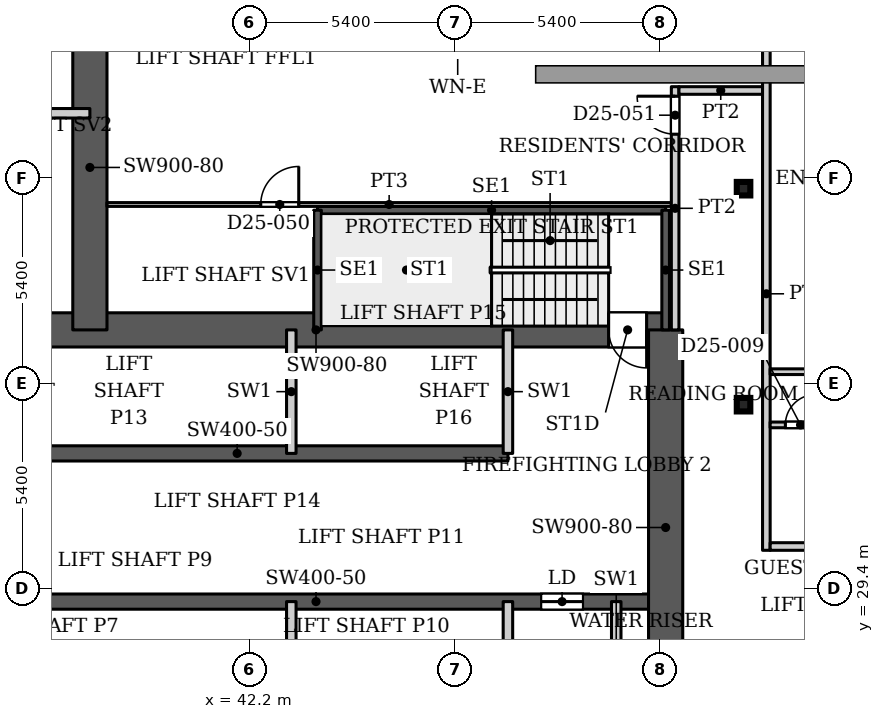
"""IFC4 building model, lengths in metres.
Left out: names, types, materials, properties, quantities, classifications, styles, units other than length and angle.
Written with IfcOpenShell. Run it as: python <this file> out.ifc"""

import sys

from ifc_helpers import new_model, si_unit, direction, frame, frame_2d, origin, origin_2d, place, context, subcontext, project, spatial, rectangle, hollow_rectangle, extrude, source, transform, mapped, element, fill, save


model = new_model("IFC4")
c1 = context("Model", 3, precision=1e-05, world=origin(), true_north=direction((0.0, 1.0)))
c2 = subcontext(c1, "Body", "Model", "MODEL_VIEW")
j1 = project(units=[si_unit("LENGTHUNIT", "METRE"), si_unit("PLANEANGLEUNIT", "RADIAN")], contexts=[c1])
p1 = place(None, origin())
s1 = spatial("IfcSite", under=j1, at=p1, CompositionType="ELEMENT")
p2 = place(p1, origin())
s2 = spatial("IfcBuilding", under=s1, at=p2, CompositionType="ELEMENT")
p3 = place(p2, frame((0.0, 0.0, 109.7)))
s3 = spatial("IfcBuildingStorey", under=s2, at=p3, CompositionType="ELEMENT", Elevation=109.7)
for number, where, z_axis, x_axis in (
    (1, (55.2, 34.232, 0.0), (0.0, 0.0, 1.0), (1.0, 0.0, 0.0)),
    (2, (55.2, 39.916, 0.0), (0.0, 0.0, 1.0), (1.0, 0.0, 0.0)),
):
    element("IfcColumn", number, at=place(p3, frame(where, z_axis=z_axis, x_axis=x_axis)), inside=s3, PredefinedType="COLUMN", context=c2, shape_type="SweptSolid", body=[
        extrude(hollow_rectangle(XDim=0.356, YDim=0.356, WallThickness=0.016, InnerFilletRadius=0.016, OuterFilletRadius=0.032, at=origin_2d()), origin(), (0.0, 0.0, 1.0), 3.9),
    ])
p4 = place(p3, frame((34.75, 29.05, 0.0), z_axis=(0.0, 0.0, 1.0), x_axis=(1.0, 0.0, 0.0)))
e3 = element("IfcWall", 3, at=p4, inside=s3, PredefinedType="SHEAR", context=c2, shape_type="SweptSolid", body=[
    extrude(rectangle(XDim=18.4, YDim=0.4, at=frame_2d((9.2, 0.0))), origin(), (0.0, 0.0, 1.0), 3.9),
])
p5 = place(p4, frame((15.125, 0.0, 0.0)))
e4 = element("IfcOpeningElement", 4, at=p5, cuts=e3, PredefinedType="OPENING", context=c2, shape_type="SweptSolid", body=[
    extrude(rectangle(XDim=1.1, YDim=2.2, at=frame_2d((0.55, 1.1))), frame((0.0, 0.21, 0.0), z_axis=(0.0, -1.0, 0.0), x_axis=(1.0, 0.0, 0.0)), (0.0, 0.0, 1.0), 0.42),
])
p6 = place(p3, frame((34.75, 32.95, 0.0), z_axis=(0.0, 0.0, 1.0), x_axis=(1.0, 0.0, 0.0)))
e5 = element("IfcWall", 5, at=p6, inside=s3, PredefinedType="SHEAR", context=c2, shape_type="SweptSolid", body=[
    extrude(rectangle(XDim=14.25, YDim=0.4, at=frame_2d((7.125, 0.0))), origin(), (0.0, 0.0, 1.0), 3.9),
])
p7 = place(p3, frame((34.75, 36.2, 0.0), z_axis=(0.0, 0.0, 1.0), x_axis=(1.0, 0.0, 0.0)))
e6 = element("IfcWall", 6, at=p7, inside=s3, PredefinedType="SHEAR", context=c2, shape_type="SweptSolid", body=[
    extrude(rectangle(XDim=18.4, YDim=0.9, at=frame_2d((9.2, 0.0))), origin(), (0.0, 0.0, 1.0), 3.9),
])
p8 = place(p7, frame((16.9, 0.0, 0.0)))
e7 = element("IfcOpeningElement", 7, at=p8, cuts=e6, PredefinedType="OPENING", context=c2, shape_type="SweptSolid", body=[
    extrude(rectangle(XDim=1.0, YDim=2.2, at=frame_2d((0.5, 1.1))), frame((0.0, 0.46, 0.0), z_axis=(0.0, -1.0, 0.0), x_axis=(1.0, 0.0, 0.0)), (0.0, 0.0, 1.0), 0.92),
])
p9 = place(p3, frame((38.0, 36.2, 0.0), z_axis=(0.0, 0.0, 1.0), x_axis=(0.0, 1.0, 0.0)))
e8 = element("IfcWall", 8, at=p9, inside=s3, PredefinedType="SHEAR", context=c2, shape_type="SweptSolid", body=[
    extrude(rectangle(XDim=8.55, YDim=0.9, at=frame_2d((4.275, 0.0))), origin(), (0.0, 0.0, 1.0), 3.9),
])
p10 = place(p3, frame((53.15, 25.8, 0.0), z_axis=(0.0, 0.0, 1.0), x_axis=(0.0, 1.0, 0.0)))
e9 = element("IfcWall", 9, at=p10, inside=s3, PredefinedType="SHEAR", context=c2, shape_type="SweptSolid", body=[
    extrude(rectangle(XDim=10.4, YDim=0.9, at=frame_2d((5.2, 0.0))), origin(), (0.0, 0.0, 1.0), 3.9),
])
p11 = place(p10, frame((1.175, 0.0, 0.0)))
e10 = element("IfcOpeningElement", 10, at=p11, cuts=e9, PredefinedType="OPENING", context=c2, shape_type="SweptSolid", body=[
    extrude(rectangle(XDim=0.9, YDim=2.2, at=frame_2d((0.45, 1.1))), frame((0.0, 0.46, 0.0), z_axis=(0.0, -1.0, 0.0), x_axis=(1.0, 0.0, 0.0)), (0.0, 0.0, 1.0), 0.92),
])
p12 = place(p3, frame((43.99, 39.35, 0.0), z_axis=(0.0, 0.0, 1.0), x_axis=(1.0, 0.0, 0.0)))
e11 = element("IfcWall", 11, at=p12, inside=s3, PredefinedType="SHEAR", context=c2, shape_type="SweptSolid", body=[
    extrude(rectangle(XDim=9.16, YDim=0.2, at=frame_2d((4.58, 0.0))), origin(), (0.0, 0.0, 1.0), 3.9),
])
for number, where, z_axis, x_axis in (
    (12, (43.99, 36.2, 0.0), (0.0, 0.0, 1.0), (0.0, 1.0, 0.0)),
    (13, (53.15, 36.2, 0.0), (0.0, 0.0, 1.0), (0.0, 1.0, 0.0)),
):
    element("IfcWall", number, at=place(p3, frame(where, z_axis=z_axis, x_axis=x_axis)), inside=s3, PredefinedType="SHEAR", context=c2, shape_type="SweptSolid", body=[
        extrude(rectangle(XDim=3.15, YDim=0.2, at=frame_2d((1.575, 0.0))), origin(), (0.0, 0.0, 1.0), 3.9),
    ])
for number, where, z_axis, x_axis in (
    (14, (43.3, 25.8, 0.0), (0.0, 0.0, 1.0), (0.0, 1.0, 0.0)),
    (15, (43.3, 32.95, 0.0), (0.0, 0.0, 1.0), (0.0, 1.0, 0.0)),
    (16, (49.0, 25.8, 0.0), (0.0, 0.0, 1.0), (0.0, 1.0, 0.0)),
    (17, (49.0, 32.95, 0.0), (0.0, 0.0, 1.0), (0.0, 1.0, 0.0)),
    (18, (51.85, 25.8, 0.0), (0.0, 0.0, 1.0), (0.0, 1.0, 0.0)),
    (19, (34.75, 41.9, 0.0), (0.0, 0.0, 1.0), (1.0, 0.0, 0.0)),
):
    element("IfcWall", number, at=place(p3, frame(where, z_axis=z_axis, x_axis=x_axis)), inside=s3, PredefinedType="PARTITIONING", context=c2, shape_type="SweptSolid", body=[
        extrude(rectangle(XDim=3.25, YDim=0.25, at=frame_2d((1.625, 0.0))), origin(), (0.0, 0.0, 1.0), 3.9),
    ])
p13 = place(p3, frame((38.449, 39.5, 0.0), z_axis=(0.0, 0.0, 1.0), x_axis=(1.0, 0.0, 0.0)))
e20 = element("IfcWall", 20, at=p13, inside=s3, PredefinedType="PARTITIONING", context=c2, shape_type="SweptSolid", body=[
    extrude(rectangle(XDim=14.851, YDim=0.1, at=frame_2d((7.426, 0.0))), origin(), (0.0, 0.0, 1.0), 3.6),
])
p14 = place(p13, frame((4.047, 0.0, 0.0)))
e21 = element("IfcOpeningElement", 21, at=p14, cuts=e20, PredefinedType="OPENING", context=c2, shape_type="SweptSolid", body=[
    extrude(rectangle(XDim=1.0, YDim=2.1, at=frame_2d((0.5, 1.05))), frame((0.0, 0.06, 0.0), z_axis=(0.0, -1.0, 0.0), x_axis=(1.0, 0.0, 0.0)), (0.0, 0.0, 1.0), 0.12),
])
p15 = place(p3, frame((53.4, 36.199, 0.0), z_axis=(0.0, 0.0, 1.0), x_axis=(0.0, 1.0, 0.0)))
e22 = element("IfcWall", 22, at=p15, inside=s3, PredefinedType="PARTITIONING", context=c2, shape_type="SweptSolid", body=[
    extrude(rectangle(XDim=6.401, YDim=0.2, at=frame_2d((3.201, 0.0))), origin(), (0.0, 0.0, 1.0), 3.6),
])
p16 = place(p15, frame((5.151, 0.0, 0.0)))
e23 = element("IfcOpeningElement", 23, at=p16, cuts=e22, PredefinedType="OPENING", context=c2, shape_type="SweptSolid", body=[
    extrude(rectangle(XDim=1.0, YDim=2.1, at=frame_2d((0.5, 1.05))), frame((0.0, 0.11, 0.0), z_axis=(0.0, -1.0, 0.0), x_axis=(1.0, 0.0, 0.0)), (0.0, 0.0, 1.0), 0.22),
])
p17 = place(p3, frame((53.5, 42.5, 0.0), z_axis=(0.0, 0.0, 1.0), x_axis=(1.0, 0.0, 0.0)))
e24 = element("IfcWall", 24, at=p17, inside=s3, PredefinedType="PARTITIONING", context=c2, shape_type="SweptSolid", body=[
    extrude(rectangle(XDim=2.2, YDim=0.2, at=frame_2d((1.1, 0.0))), origin(), (0.0, 0.0, 1.0), 3.6),
])
p18 = place(p3, frame((55.8, 30.4, 0.0), z_axis=(0.0, 0.0, 1.0), x_axis=(0.0, 1.0, 0.0)))
e25 = element("IfcWall", 25, at=p18, inside=s3, PredefinedType="PARTITIONING", context=c2, shape_type="SweptSolid", body=[
    extrude(rectangle(XDim=13.5, YDim=0.2, at=frame_2d((6.75, 0.0))), origin(), (0.0, 0.0, 1.0), 3.6),
])
p19 = place(p3, frame((55.9, 30.5, 0.0), z_axis=(0.0, 0.0, 1.0), x_axis=(1.0, 0.0, 0.0)))
e26 = element("IfcWall", 26, at=p19, inside=s3, PredefinedType="PARTITIONING", context=c2, shape_type="SweptSolid", body=[
    extrude(rectangle(XDim=42.2, YDim=0.2, at=frame_2d((21.1, 0.0))), origin(), (0.0, 0.0, 1.0), 3.6),
])
p20 = place(p19, frame((9.75, 0.0, 0.0)))
e27 = element("IfcOpeningElement", 27, at=p20, cuts=e26, PredefinedType="OPENING", context=c2, shape_type="SweptSolid", body=[
    extrude(rectangle(XDim=1.0, YDim=2.1, at=frame_2d((0.5, 1.05))), frame((0.0, 0.11, 0.0), z_axis=(0.0, -1.0, 0.0), x_axis=(1.0, 0.0, 0.0)), (0.0, 0.0, 1.0), 0.22),
])
p21 = place(p19, frame((18.6, 0.0, 0.0)))
e28 = element("IfcOpeningElement", 28, at=p21, cuts=e26, PredefinedType="OPENING", context=c2, shape_type="SweptSolid", body=[
    extrude(rectangle(XDim=1.0, YDim=2.1, at=frame_2d((0.5, 1.05))), frame((0.0, 0.11, 0.0), z_axis=(0.0, -1.0, 0.0), x_axis=(1.0, 0.0, 0.0)), (0.0, 0.0, 1.0), 0.22),
])
p22 = place(p19, frame((23.4, 0.0, 0.0)))
e29 = element("IfcOpeningElement", 29, at=p22, cuts=e26, PredefinedType="OPENING", context=c2, shape_type="SweptSolid", body=[
    extrude(rectangle(XDim=1.0, YDim=2.1, at=frame_2d((0.5, 1.05))), frame((0.0, 0.11, 0.0), z_axis=(0.0, -1.0, 0.0), x_axis=(1.0, 0.0, 0.0)), (0.0, 0.0, 1.0), 0.22),
])
p23 = place(p19, frame((40.2, 0.0, 0.0)))
e30 = element("IfcOpeningElement", 30, at=p23, cuts=e26, PredefinedType="OPENING", context=c2, shape_type="SweptSolid", body=[
    extrude(rectangle(XDim=1.0, YDim=2.1, at=frame_2d((0.5, 1.05))), frame((0.0, 0.11, 0.0), z_axis=(0.0, -1.0, 0.0), x_axis=(1.0, 0.0, 0.0)), (0.0, 0.0, 1.0), 0.22),
])
p24 = place(p3, frame((55.9, 33.7, 0.0), z_axis=(0.0, 0.0, 1.0), x_axis=(1.0, 0.0, 0.0)))
e31 = element("IfcWall", 31, at=p24, inside=s3, PredefinedType="PARTITIONING", context=c2, shape_type="SweptSolid", body=[
    extrude(rectangle(XDim=9.275, YDim=0.15, at=frame_2d((4.638, 0.0))), origin(), (0.0, 0.0, 1.0), 3.6),
])
p25 = place(p24, frame((7.6, 0.0, 0.0)))
e32 = element("IfcOpeningElement", 32, at=p25, cuts=e31, PredefinedType="OPENING", context=c2, shape_type="SweptSolid", body=[
    extrude(rectangle(XDim=0.8, YDim=2.1, at=frame_2d((0.4, 1.05))), frame((0.0, 0.085, 0.0), z_axis=(0.0, -1.0, 0.0), x_axis=(1.0, 0.0, 0.0)), (0.0, 0.0, 1.0), 0.17),
])
p26 = place(p24, frame((2.9, 0.0, 0.0)))
e33 = element("IfcOpeningElement", 33, at=p26, cuts=e31, PredefinedType="OPENING", context=c2, shape_type="SweptSolid", body=[
    extrude(rectangle(XDim=0.9, YDim=2.1, at=frame_2d((0.45, 1.05))), frame((0.0, 0.085, 0.0), z_axis=(0.0, -1.0, 0.0), x_axis=(1.0, 0.0, 0.0)), (0.0, 0.0, 1.0), 0.17),
])
p27 = place(p24, frame((5.5, 0.0, 0.0)))
e34 = element("IfcOpeningElement", 34, at=p27, cuts=e31, PredefinedType="OPENING", context=c2, shape_type="SweptSolid", body=[
    extrude(rectangle(XDim=0.8, YDim=2.1, at=frame_2d((0.4, 1.05))), frame((0.0, 0.085, 0.0), z_axis=(0.0, -1.0, 0.0), x_axis=(1.0, 0.0, 0.0)), (0.0, 0.0, 1.0), 0.17),
])
p28 = place(p24, frame((0.4, 0.0, 0.0)))
e35 = element("IfcOpeningElement", 35, at=p28, cuts=e31, PredefinedType="OPENING", context=c2, shape_type="SweptSolid", body=[
    extrude(rectangle(XDim=0.8, YDim=2.1, at=frame_2d((0.4, 1.05))), frame((0.0, 0.085, 0.0), z_axis=(0.0, -1.0, 0.0), x_axis=(1.0, 0.0, 0.0)), (0.0, 0.0, 1.0), 0.17),
])
p29 = place(p3, frame((55.9, 35.1, 0.0), z_axis=(0.0, 0.0, 1.0), x_axis=(1.0, 0.0, 0.0)))
e36 = element("IfcWall", 36, at=p29, inside=s3, PredefinedType="PARTITIONING", context=c2, shape_type="SweptSolid", body=[
    extrude(rectangle(XDim=11.2, YDim=0.15, at=frame_2d((5.6, 0.0))), origin(), (0.0, 0.0, 1.0), 3.6),
])
p30 = place(p29, frame((9.05, 0.0, 0.0)))
e37 = element("IfcOpeningElement", 37, at=p30, cuts=e36, PredefinedType="OPENING", context=c2, shape_type="SweptSolid", body=[
    extrude(rectangle(XDim=0.9, YDim=2.1, at=frame_2d((0.45, 1.05))), frame((0.0, 0.085, 0.0), z_axis=(0.0, -1.0, 0.0), x_axis=(1.0, 0.0, 0.0)), (0.0, 0.0, 1.0), 0.17),
])
p31 = place(p29, frame((1.5, 0.0, 0.0)))
e38 = element("IfcOpeningElement", 38, at=p31, cuts=e36, PredefinedType="OPENING", context=c2, shape_type="SweptSolid", body=[
    extrude(rectangle(XDim=1.0, YDim=2.1, at=frame_2d((0.5, 1.05))), frame((0.0, 0.085, 0.0), z_axis=(0.0, -1.0, 0.0), x_axis=(1.0, 0.0, 0.0)), (0.0, 0.0, 1.0), 0.17),
])
p32 = place(p29, frame((6.5, 0.0, 0.0)))
e39 = element("IfcOpeningElement", 39, at=p32, cuts=e36, PredefinedType="OPENING", context=c2, shape_type="SweptSolid", body=[
    extrude(rectangle(XDim=0.9, YDim=2.1, at=frame_2d((0.45, 1.05))), frame((0.0, 0.085, 0.0), z_axis=(0.0, -1.0, 0.0), x_axis=(1.0, 0.0, 0.0)), (0.0, 0.0, 1.0), 0.17),
])
m1 = source(origin(), c2, "Body", "SweptSolid", [
    extrude(rectangle(XDim=1.1, YDim=2.2, at=frame_2d((0.55, 1.1))), frame((0.0, 0.025, 0.0), z_axis=(0.0, -1.0, 0.0), x_axis=(1.0, 0.0, 0.0)), (0.0, 0.0, 1.0), 0.05),
])
p33 = place(p5, origin())
e40 = element("IfcDoor", 40, at=p33, inside=s3, OperationType="SLIDING_TO_LEFT", PredefinedType="DOOR", context=c2, shape_type="MappedRepresentation", body=[
    mapped(m1, transform((0.0, 0.0, 0.0), x_axis=(1.0, 0.0, 0.0), y_axis=(0.0, 1.0, 0.0), z_axis=(0.0, 0.0, 1.0), scale=1.0)),
])
fill(e4, e40)
m2 = source(origin(), c2, "Body", "SweptSolid", [
    extrude(rectangle(XDim=1.0, YDim=2.2, at=frame_2d((0.5, 1.1))), frame((0.0, 0.025, 0.0), z_axis=(0.0, -1.0, 0.0), x_axis=(1.0, 0.0, 0.0)), (0.0, 0.0, 1.0), 0.05),
])
p34 = place(p8, origin())
e41 = element("IfcDoor", 41, at=p34, inside=s3, OperationType="SINGLE_SWING_RIGHT", PredefinedType="DOOR", context=c2, shape_type="MappedRepresentation", body=[
    mapped(m2, transform((0.0, 0.0, 0.0), x_axis=(1.0, 0.0, 0.0), y_axis=(0.0, 1.0, 0.0), z_axis=(0.0, 0.0, 1.0), scale=1.0)),
])
fill(e7, e41)
m3 = source(origin(), c2, "Body", "SweptSolid", [
    extrude(rectangle(XDim=0.8, YDim=2.1, at=frame_2d((0.4, 1.05))), frame((0.0, 0.025, 0.0), z_axis=(0.0, -1.0, 0.0), x_axis=(1.0, 0.0, 0.0)), (0.0, 0.0, 1.0), 0.05),
])
p35 = place(p28, origin())
e42 = element("IfcDoor", 42, at=p35, inside=s3, OperationType="SINGLE_SWING_LEFT", PredefinedType="DOOR", context=c2, shape_type="MappedRepresentation", body=[
    mapped(m3, transform((0.0, 0.0, 0.0), x_axis=(1.0, 0.0, 0.0), y_axis=(0.0, 1.0, 0.0), z_axis=(0.0, 0.0, 1.0), scale=1.0)),
])
fill(e35, e42)
m4 = source(origin(), c2, "Body", "SweptSolid", [
    extrude(rectangle(XDim=1.0, YDim=2.1, at=frame_2d((0.5, 1.05))), frame((0.0, 0.025, 0.0), z_axis=(0.0, -1.0, 0.0), x_axis=(1.0, 0.0, 0.0)), (0.0, 0.0, 1.0), 0.05),
])
p36 = place(p14, origin())
e43 = element("IfcDoor", 43, at=p36, inside=s3, OperationType="SINGLE_SWING_LEFT", PredefinedType="DOOR", context=c2, shape_type="MappedRepresentation", body=[
    mapped(m4, transform((0.0, 0.0, 0.0), x_axis=(1.0, 0.0, 0.0), y_axis=(0.0, 1.0, 0.0), z_axis=(0.0, 0.0, 1.0), scale=1.0)),
])
fill(e21, e43)
m5 = source(origin(), c2, "Body", "SweptSolid", [
    extrude(rectangle(XDim=1.0, YDim=2.1, at=frame_2d((0.5, 1.05))), frame((0.0, 0.025, 0.0), z_axis=(0.0, -1.0, 0.0), x_axis=(1.0, 0.0, 0.0)), (0.0, 0.0, 1.0), 0.05),
])
p37 = place(p16, origin())
e44 = element("IfcDoor", 44, at=p37, inside=s3, OperationType="SINGLE_SWING_LEFT", PredefinedType="DOOR", context=c2, shape_type="MappedRepresentation", body=[
    mapped(m5, transform((0.0, 0.0, 0.0), x_axis=(1.0, 0.0, 0.0), y_axis=(0.0, 1.0, 0.0), z_axis=(0.0, 0.0, 1.0), scale=1.0)),
])
fill(e23, e44)
save(model, sys.argv[1])
